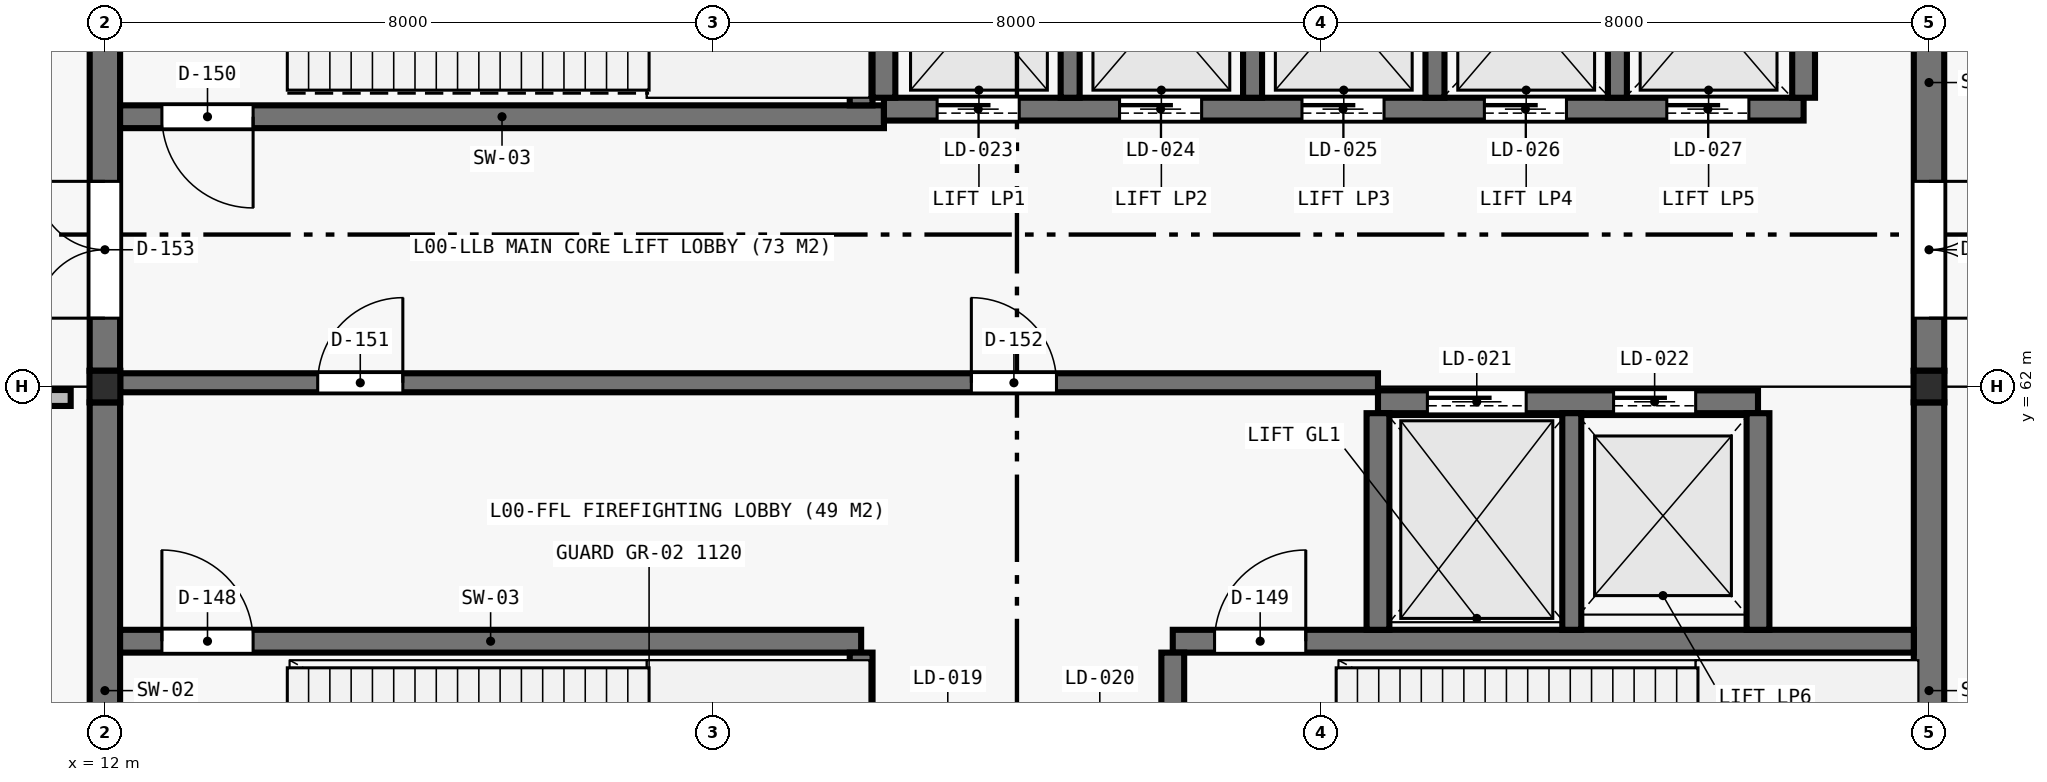
"""IFC4 building model, lengths in metres.
Left out: names, types, materials, properties, quantities, classifications, styles, units other than length and angle.
Written with IfcOpenShell. Run it as: python <this file> out.ifc"""

import sys

from ifc_helpers import new_model, si_unit, direction, frame, frame_2d, origin, origin_2d, place, context, subcontext, project, spatial, rectangle, i_section, extrude, element, fill, save


model = new_model("IFC4")
c1 = context("Model", 3, precision=1e-05, world=origin(), true_north=direction((0.0, 1.0)))
c2 = subcontext(c1, "Body", "Model", "MODEL_VIEW")
j1 = project(units=[si_unit("LENGTHUNIT", "METRE"), si_unit("PLANEANGLEUNIT", "RADIAN")], contexts=[c1])
p1 = place(None, origin())
s1 = spatial("IfcSite", under=j1, at=p1, CompositionType="ELEMENT")
p2 = place(p1, origin())
s2 = spatial("IfcBuilding", under=s1, at=p2, CompositionType="ELEMENT")
p3 = place(p2, origin())
s3 = spatial("IfcBuildingStorey", under=s2, at=p3, CompositionType="ELEMENT", Elevation=0.0)
for number, where, z_axis, x_axis in (
    (1, (12.0, 62.0, 0.0), (0.0, 0.0, 1.0), (1.0, 0.0, 0.0)),
    (2, (36.0, 62.0, 0.0), (0.0, 0.0, 1.0), (1.0, 0.0, 0.0)),
):
    element("IfcColumn", number, at=place(p3, frame(where, z_axis=z_axis, x_axis=x_axis)), inside=s3, PredefinedType="COLUMN", context=c2, shape_type="SweptSolid", body=[
        extrude(i_section(OverallWidth=0.406, OverallDepth=0.416, WebThickness=0.03, FlangeThickness=0.048, at=origin_2d()), origin(), (0.0, 0.0, 1.0), 6.02),
    ])
p4 = place(p3, frame((12.0, 54.208, 0.0), z_axis=(0.0, 0.0, 1.0), x_axis=(0.0, 1.0, 0.0)))
e3 = element("IfcWall", 3, at=p4, inside=s3, PredefinedType="SHEAR", context=c2, shape_type="SweptSolid", body=[
    extrude(rectangle(XDim=7.584, YDim=0.4, at=frame_2d((3.792, 0.0))), origin(), (0.0, 0.0, 1.0), 6.02),
])
p5 = place(p3, frame((12.0, 62.208, 0.0), z_axis=(0.0, 0.0, 1.0), x_axis=(0.0, 1.0, 0.0)))
e4 = element("IfcWall", 4, at=p5, inside=s3, PredefinedType="SHEAR", context=c2, shape_type="SweptSolid", body=[
    extrude(rectangle(XDim=7.584, YDim=0.4, at=frame_2d((3.792, 0.0))), origin(), (0.0, 0.0, 1.0), 6.02),
])
p6 = place(p5, frame((0.692, 0.0, 0.0)))
e5 = element("IfcOpeningElement", 5, at=p6, cuts=e4, PredefinedType="OPENING", context=c2, shape_type="SweptSolid", body=[
    extrude(rectangle(XDim=1.8, YDim=2.2, at=frame_2d((0.9, 1.1))), frame((0.0, 0.21, 0.0), z_axis=(0.0, -1.0, 0.0), x_axis=(1.0, 0.0, 0.0)), (0.0, 0.0, 1.0), 0.42),
])
p7 = place(p3, frame((36.0, 54.208, 0.0), z_axis=(0.0, 0.0, 1.0), x_axis=(0.0, 1.0, 0.0)))
e6 = element("IfcWall", 6, at=p7, inside=s3, PredefinedType="SHEAR", context=c2, shape_type="SweptSolid", body=[
    extrude(rectangle(XDim=7.584, YDim=0.4, at=frame_2d((3.792, 0.0))), origin(), (0.0, 0.0, 1.0), 6.02),
])
p8 = place(p3, frame((36.0, 62.208, 0.0), z_axis=(0.0, 0.0, 1.0), x_axis=(0.0, 1.0, 0.0)))
e7 = element("IfcWall", 7, at=p8, inside=s3, PredefinedType="SHEAR", context=c2, shape_type="SweptSolid", body=[
    extrude(rectangle(XDim=7.584, YDim=0.4, at=frame_2d((3.792, 0.0))), origin(), (0.0, 0.0, 1.0), 6.02),
])
p9 = place(p8, frame((0.692, 0.0, 0.0)))
e8 = element("IfcOpeningElement", 8, at=p9, cuts=e7, PredefinedType="OPENING", context=c2, shape_type="SweptSolid", body=[
    extrude(rectangle(XDim=1.8, YDim=2.2, at=frame_2d((0.9, 1.1))), frame((0.0, 0.21, 0.0), z_axis=(0.0, -1.0, 0.0), x_axis=(1.0, 0.0, 0.0)), (0.0, 0.0, 1.0), 0.42),
])
p10 = place(p3, frame((12.2, 58.65, 0.0), z_axis=(0.0, 0.0, 1.0), x_axis=(1.0, 0.0, 0.0)))
e9 = element("IfcWall", 9, at=p10, inside=s3, PredefinedType="SHEAR", context=c2, shape_type="SweptSolid", body=[
    extrude(rectangle(XDim=9.75, YDim=0.3, at=frame_2d((4.875, 0.0))), origin(), (0.0, 0.0, 1.0), 6.02),
])
p11 = place(p10, frame((0.55, 0.0, 0.0)))
e10 = element("IfcOpeningElement", 10, at=p11, cuts=e9, PredefinedType="OPENING", context=c2, shape_type="SweptSolid", body=[
    extrude(rectangle(XDim=1.2, YDim=2.2, at=frame_2d((0.6, 1.1))), frame((0.0, 0.16, 0.0), z_axis=(0.0, -1.0, 0.0), x_axis=(1.0, 0.0, 0.0)), (0.0, 0.0, 1.0), 0.32),
])
p12 = place(p3, frame((21.95, 54.25, 0.0), z_axis=(0.0, 0.0, 1.0), x_axis=(0.0, 1.0, 0.0)))
e11 = element("IfcWall", 11, at=p12, inside=s3, PredefinedType="SHEAR", context=c2, shape_type="SweptSolid", body=[
    extrude(rectangle(XDim=4.25, YDim=0.3, at=frame_2d((2.125, 0.0))), origin(), (0.0, 0.0, 1.0), 6.02),
])
p13 = place(p3, frame((26.05, 58.65, 0.0), z_axis=(0.0, 0.0, 1.0), x_axis=(1.0, 0.0, 0.0)))
e12 = element("IfcWall", 12, at=p13, inside=s3, PredefinedType="SHEAR", context=c2, shape_type="SweptSolid", body=[
    extrude(rectangle(XDim=9.75, YDim=0.3, at=frame_2d((4.875, 0.0))), origin(), (0.0, 0.0, 1.0), 6.02),
])
p14 = place(p13, frame((0.55, 0.0, 0.0)))
e13 = element("IfcOpeningElement", 13, at=p14, cuts=e12, PredefinedType="OPENING", context=c2, shape_type="SweptSolid", body=[
    extrude(rectangle(XDim=1.2, YDim=2.2, at=frame_2d((0.6, 1.1))), frame((0.0, 0.16, 0.0), z_axis=(0.0, -1.0, 0.0), x_axis=(1.0, 0.0, 0.0)), (0.0, 0.0, 1.0), 0.32),
])
p15 = place(p3, frame((26.05, 54.25, 0.0), z_axis=(0.0, 0.0, 1.0), x_axis=(0.0, 1.0, 0.0)))
e14 = element("IfcWall", 14, at=p15, inside=s3, PredefinedType="SHEAR", context=c2, shape_type="SweptSolid", body=[
    extrude(rectangle(XDim=4.25, YDim=0.3, at=frame_2d((2.125, 0.0))), origin(), (0.0, 0.0, 1.0), 6.02),
])
p16 = place(p3, frame((28.75, 61.8, 0.0), z_axis=(0.0, 0.0, 1.0), x_axis=(1.0, 0.0, 0.0)))
e15 = element("IfcWall", 15, at=p16, inside=s3, PredefinedType="SHEAR", context=c2, shape_type="SweptSolid", body=[
    extrude(rectangle(XDim=5.0, YDim=0.3, at=frame_2d((2.5, 0.0))), origin(), (0.0, 0.0, 1.0), 6.02),
])
p17 = place(p16, frame((0.65, 0.0, 0.0)))
e16 = element("IfcOpeningElement", 16, at=p17, cuts=e15, PredefinedType="OPENING", context=c2, shape_type="SweptSolid", body=[
    extrude(rectangle(XDim=1.3, YDim=2.3, at=frame_2d((0.65, 1.15))), frame((0.0, 0.16, 0.0), z_axis=(0.0, -1.0, 0.0), x_axis=(1.0, 0.0, 0.0)), (0.0, 0.0, 1.0), 0.32),
])
p18 = place(p16, frame((3.1, 0.0, 0.0)))
e17 = element("IfcOpeningElement", 17, at=p18, cuts=e15, PredefinedType="OPENING", context=c2, shape_type="SweptSolid", body=[
    extrude(rectangle(XDim=1.08, YDim=2.2, at=frame_2d((0.54, 1.1))), frame((0.0, 0.16, 0.0), z_axis=(0.0, -1.0, 0.0), x_axis=(1.0, 0.0, 0.0)), (0.0, 0.0, 1.0), 0.32),
])
for number, where, z_axis, x_axis in (
    (18, (28.75, 58.8, 0.0), (0.0, 0.0, 1.0), (0.0, 1.0, 0.0)),
    (19, (33.75, 58.8, 0.0), (0.0, 0.0, 1.0), (0.0, 1.0, 0.0)),
):
    element("IfcWall", number, at=place(p3, frame(where, z_axis=z_axis, x_axis=x_axis)), inside=s3, PredefinedType="SHEAR", context=c2, shape_type="SweptSolid", body=[
        extrude(rectangle(XDim=2.85, YDim=0.3, at=frame_2d((1.425, 0.0))), origin(), (0.0, 0.0, 1.0), 6.02),
    ])
p19 = place(p3, frame((31.3, 58.8, 0.0), z_axis=(0.0, 0.0, 1.0), x_axis=(0.0, 1.0, 0.0)))
e20 = element("IfcWall", 20, at=p19, inside=s3, PredefinedType="SHEAR", context=c2, shape_type="SweptSolid", body=[
    extrude(rectangle(XDim=2.85, YDim=0.25, at=frame_2d((1.425, 0.0))), origin(), (0.0, 0.0, 1.0), 6.02),
])
p20 = place(p3, frame((12.2, 62.05, 0.0), z_axis=(0.0, 0.0, 1.0), x_axis=(1.0, 0.0, 0.0)))
e21 = element("IfcWall", 21, at=p20, inside=s3, PredefinedType="SHEAR", context=c2, shape_type="SweptSolid", body=[
    extrude(rectangle(XDim=16.55, YDim=0.25, at=frame_2d((8.275, 0.0))), origin(), (0.0, 0.0, 1.0), 6.02),
])
p21 = place(p20, frame((2.6, 0.0, 0.0)))
e22 = element("IfcOpeningElement", 22, at=p21, cuts=e21, PredefinedType="OPENING", context=c2, shape_type="SweptSolid", body=[
    extrude(rectangle(XDim=1.12, YDim=2.22, at=frame_2d((0.56, 1.11))), frame((0.0, 0.135, 0.0), z_axis=(0.0, -1.0, 0.0), x_axis=(1.0, 0.0, 0.0)), (0.0, 0.0, 1.0), 0.27),
])
p22 = place(p20, frame((11.2, 0.0, 0.0)))
e23 = element("IfcOpeningElement", 23, at=p22, cuts=e21, PredefinedType="OPENING", context=c2, shape_type="SweptSolid", body=[
    extrude(rectangle(XDim=1.12, YDim=2.22, at=frame_2d((0.56, 1.11))), frame((0.0, 0.135, 0.0), z_axis=(0.0, -1.0, 0.0), x_axis=(1.0, 0.0, 0.0)), (0.0, 0.0, 1.0), 0.27),
])
p23 = place(p3, frame((12.2, 65.55, 0.0), z_axis=(0.0, 0.0, 1.0), x_axis=(1.0, 0.0, 0.0)))
e24 = element("IfcWall", 24, at=p23, inside=s3, PredefinedType="SHEAR", context=c2, shape_type="SweptSolid", body=[
    extrude(rectangle(XDim=10.05, YDim=0.3, at=frame_2d((5.025, 0.0))), origin(), (0.0, 0.0, 1.0), 6.02),
])
p24 = place(p23, frame((0.55, 0.0, 0.0)))
e25 = element("IfcOpeningElement", 25, at=p24, cuts=e24, PredefinedType="OPENING", context=c2, shape_type="SweptSolid", body=[
    extrude(rectangle(XDim=1.2, YDim=2.2, at=frame_2d((0.6, 1.1))), frame((0.0, 0.16, 0.0), z_axis=(0.0, -1.0, 0.0), x_axis=(1.0, 0.0, 0.0)), (0.0, 0.0, 1.0), 0.32),
])
p25 = place(p3, frame((21.95, 65.7, 0.0), z_axis=(0.0, 0.0, 1.0), x_axis=(0.0, 1.0, 0.0)))
e26 = element("IfcWall", 26, at=p25, inside=s3, PredefinedType="SHEAR", context=c2, shape_type="SweptSolid", body=[
    extrude(rectangle(XDim=4.05, YDim=0.3, at=frame_2d((2.025, 0.0))), origin(), (0.0, 0.0, 1.0), 6.02),
])
p26 = place(p3, frame((22.25, 65.65, 0.0), z_axis=(0.0, 0.0, 1.0), x_axis=(1.0, 0.0, 0.0)))
e27 = element("IfcWall", 27, at=p26, inside=s3, PredefinedType="SHEAR", context=c2, shape_type="SweptSolid", body=[
    extrude(rectangle(XDim=12.1, YDim=0.3, at=frame_2d((6.05, 0.0))), origin(), (0.0, 0.0, 1.0), 6.02),
])
p27 = place(p26, frame((0.7, 0.0, 0.0)))
e28 = element("IfcOpeningElement", 28, at=p27, cuts=e27, PredefinedType="OPENING", context=c2, shape_type="SweptSolid", body=[
    extrude(rectangle(XDim=1.08, YDim=2.2, at=frame_2d((0.54, 1.1))), frame((0.0, 0.16, 0.0), z_axis=(0.0, -1.0, 0.0), x_axis=(1.0, 0.0, 0.0)), (0.0, 0.0, 1.0), 0.32),
])
p28 = place(p26, frame((3.1, 0.0, 0.0)))
e29 = element("IfcOpeningElement", 29, at=p28, cuts=e27, PredefinedType="OPENING", context=c2, shape_type="SweptSolid", body=[
    extrude(rectangle(XDim=1.08, YDim=2.2, at=frame_2d((0.54, 1.1))), frame((0.0, 0.16, 0.0), z_axis=(0.0, -1.0, 0.0), x_axis=(1.0, 0.0, 0.0)), (0.0, 0.0, 1.0), 0.32),
])
p29 = place(p26, frame((5.5, 0.0, 0.0)))
e30 = element("IfcOpeningElement", 30, at=p29, cuts=e27, PredefinedType="OPENING", context=c2, shape_type="SweptSolid", body=[
    extrude(rectangle(XDim=1.08, YDim=2.2, at=frame_2d((0.54, 1.1))), frame((0.0, 0.16, 0.0), z_axis=(0.0, -1.0, 0.0), x_axis=(1.0, 0.0, 0.0)), (0.0, 0.0, 1.0), 0.32),
])
p30 = place(p26, frame((7.9, 0.0, 0.0)))
e31 = element("IfcOpeningElement", 31, at=p30, cuts=e27, PredefinedType="OPENING", context=c2, shape_type="SweptSolid", body=[
    extrude(rectangle(XDim=1.08, YDim=2.2, at=frame_2d((0.54, 1.1))), frame((0.0, 0.16, 0.0), z_axis=(0.0, -1.0, 0.0), x_axis=(1.0, 0.0, 0.0)), (0.0, 0.0, 1.0), 0.32),
])
p31 = place(p26, frame((10.3, 0.0, 0.0)))
e32 = element("IfcOpeningElement", 32, at=p31, cuts=e27, PredefinedType="OPENING", context=c2, shape_type="SweptSolid", body=[
    extrude(rectangle(XDim=1.08, YDim=2.2, at=frame_2d((0.54, 1.1))), frame((0.0, 0.16, 0.0), z_axis=(0.0, -1.0, 0.0), x_axis=(1.0, 0.0, 0.0)), (0.0, 0.0, 1.0), 0.32),
])
for number, where, z_axis, x_axis in (
    (33, (22.25, 65.8, 0.0), (0.0, 0.0, 1.0), (0.0, 1.0, 0.0)),
    (34, (34.35, 65.8, 0.0), (0.0, 0.0, 1.0), (0.0, 1.0, 0.0)),
):
    element("IfcWall", number, at=place(p3, frame(where, z_axis=z_axis, x_axis=x_axis)), inside=s3, PredefinedType="SHEAR", context=c2, shape_type="SweptSolid", body=[
        extrude(rectangle(XDim=2.3, YDim=0.3, at=frame_2d((1.15, 0.0))), origin(), (0.0, 0.0, 1.0), 6.02),
    ])
for number, where, z_axis, x_axis in (
    (35, (24.7, 65.8, 0.0), (0.0, 0.0, 1.0), (0.0, 1.0, 0.0)),
    (36, (27.1, 65.8, 0.0), (0.0, 0.0, 1.0), (0.0, 1.0, 0.0)),
    (37, (29.5, 65.8, 0.0), (0.0, 0.0, 1.0), (0.0, 1.0, 0.0)),
    (38, (31.9, 65.8, 0.0), (0.0, 0.0, 1.0), (0.0, 1.0, 0.0)),
):
    element("IfcWall", number, at=place(p3, frame(where, z_axis=z_axis, x_axis=x_axis)), inside=s3, PredefinedType="SHEAR", context=c2, shape_type="SweptSolid", body=[
        extrude(rectangle(XDim=2.3, YDim=0.25, at=frame_2d((1.15, 0.0))), origin(), (0.0, 0.0, 1.0), 6.02),
    ])
p32 = place(p3, frame((6.35, 61.85, 0.0), z_axis=(0.0, 0.0, 1.0), x_axis=(1.0, 0.0, 0.0)))
e39 = element("IfcWall", 39, at=p32, inside=s3, PredefinedType="PLUMBINGWALL", context=c2, shape_type="SweptSolid", body=[
    extrude(rectangle(XDim=5.2, YDim=0.21, at=frame_2d((2.6, 0.0))), origin(), (0.0, 0.0, 1.0), 4.92),
])
p33 = place(p32, frame((0.35, 0.0, 0.0)))
e40 = element("IfcOpeningElement", 40, at=p33, cuts=e39, PredefinedType="OPENING", context=c2, shape_type="SweptSolid", body=[
    extrude(rectangle(XDim=0.95, YDim=2.1, at=frame_2d((0.475, 1.05))), frame((0.0, 0.115, 0.0), z_axis=(0.0, -1.0, 0.0), x_axis=(1.0, 0.0, 0.0)), (0.0, 0.0, 1.0), 0.23),
])
p34 = place(p32, frame((2.1, 0.0, 0.0)))
e41 = element("IfcOpeningElement", 41, at=p34, cuts=e39, PredefinedType="OPENING", context=c2, shape_type="SweptSolid", body=[
    extrude(rectangle(XDim=0.9, YDim=2.1, at=frame_2d((0.45, 1.05))), frame((0.0, 0.115, 0.0), z_axis=(0.0, -1.0, 0.0), x_axis=(1.0, 0.0, 0.0)), (0.0, 0.0, 1.0), 0.23),
])
p35 = place(p32, frame((3.8, 0.0, 0.0)))
e42 = element("IfcOpeningElement", 42, at=p35, cuts=e39, PredefinedType="OPENING", context=c2, shape_type="SweptSolid", body=[
    extrude(rectangle(XDim=0.9, YDim=2.1, at=frame_2d((0.45, 1.05))), frame((0.0, 0.115, 0.0), z_axis=(0.0, -1.0, 0.0), x_axis=(1.0, 0.0, 0.0)), (0.0, 0.0, 1.0), 0.23),
])
p36 = place(p11, origin())
e43 = element("IfcDoor", 43, at=p36, inside=s3, OperationType="SINGLE_SWING_LEFT", PredefinedType="DOOR", context=c2, shape_type="SweptSolid", body=[
    extrude(rectangle(XDim=1.2, YDim=2.2, at=frame_2d((0.6, 1.1))), frame((0.0, 0.025, 0.0), z_axis=(0.0, -1.0, 0.0), x_axis=(1.0, 0.0, 0.0)), (0.0, 0.0, 1.0), 0.05),
])
fill(e10, e43)
p37 = place(p14, origin())
e44 = element("IfcDoor", 44, at=p37, inside=s3, OperationType="SINGLE_SWING_RIGHT", PredefinedType="DOOR", context=c2, shape_type="SweptSolid", body=[
    extrude(rectangle(XDim=1.2, YDim=2.2, at=frame_2d((0.6, 1.1))), frame((0.0, 0.025, 0.0), z_axis=(0.0, -1.0, 0.0), x_axis=(1.0, 0.0, 0.0)), (0.0, 0.0, 1.0), 0.05),
])
fill(e13, e44)
p38 = place(p24, frame((1.2, 0.0, 0.0), z_axis=(0.0, 0.0, 1.0), x_axis=(-1.0, 0.0, 0.0)))
e45 = element("IfcDoor", 45, at=p38, inside=s3, OperationType="SINGLE_SWING_LEFT", PredefinedType="DOOR", context=c2, shape_type="SweptSolid", body=[
    extrude(rectangle(XDim=1.2, YDim=2.2, at=frame_2d((0.6, 1.1))), frame((0.0, 0.025, 0.0), z_axis=(0.0, -1.0, 0.0), x_axis=(1.0, 0.0, 0.0)), (0.0, 0.0, 1.0), 0.05),
])
fill(e25, e45)
p39 = place(p17, origin())
e46 = element("IfcDoor", 46, at=p39, inside=s3, OperationType="SLIDING_TO_LEFT", PredefinedType="DOOR", context=c2, shape_type="SweptSolid", body=[
    extrude(rectangle(XDim=1.3, YDim=2.3, at=frame_2d((0.65, 1.15))), frame((0.0, 0.025, 0.0), z_axis=(0.0, -1.0, 0.0), x_axis=(1.0, 0.0, 0.0)), (0.0, 0.0, 1.0), 0.05),
])
fill(e16, e46)
p40 = place(p18, origin())
e47 = element("IfcDoor", 47, at=p40, inside=s3, OperationType="SLIDING_TO_LEFT", PredefinedType="DOOR", context=c2, shape_type="SweptSolid", body=[
    extrude(rectangle(XDim=1.08, YDim=2.2, at=frame_2d((0.54, 1.1))), frame((0.0, 0.025, 0.0), z_axis=(0.0, -1.0, 0.0), x_axis=(1.0, 0.0, 0.0)), (0.0, 0.0, 1.0), 0.05),
])
fill(e17, e47)
p41 = place(p27, origin())
e48 = element("IfcDoor", 48, at=p41, inside=s3, OperationType="SLIDING_TO_LEFT", PredefinedType="DOOR", context=c2, shape_type="SweptSolid", body=[
    extrude(rectangle(XDim=1.08, YDim=2.2, at=frame_2d((0.54, 1.1))), frame((0.0, 0.025, 0.0), z_axis=(0.0, -1.0, 0.0), x_axis=(1.0, 0.0, 0.0)), (0.0, 0.0, 1.0), 0.05),
])
fill(e28, e48)
p42 = place(p28, origin())
e49 = element("IfcDoor", 49, at=p42, inside=s3, OperationType="SLIDING_TO_LEFT", PredefinedType="DOOR", context=c2, shape_type="SweptSolid", body=[
    extrude(rectangle(XDim=1.08, YDim=2.2, at=frame_2d((0.54, 1.1))), frame((0.0, 0.025, 0.0), z_axis=(0.0, -1.0, 0.0), x_axis=(1.0, 0.0, 0.0)), (0.0, 0.0, 1.0), 0.05),
])
fill(e29, e49)
p43 = place(p29, origin())
e50 = element("IfcDoor", 50, at=p43, inside=s3, OperationType="SLIDING_TO_LEFT", PredefinedType="DOOR", context=c2, shape_type="SweptSolid", body=[
    extrude(rectangle(XDim=1.08, YDim=2.2, at=frame_2d((0.54, 1.1))), frame((0.0, 0.025, 0.0), z_axis=(0.0, -1.0, 0.0), x_axis=(1.0, 0.0, 0.0)), (0.0, 0.0, 1.0), 0.05),
])
fill(e30, e50)
p44 = place(p30, origin())
e51 = element("IfcDoor", 51, at=p44, inside=s3, OperationType="SLIDING_TO_LEFT", PredefinedType="DOOR", context=c2, shape_type="SweptSolid", body=[
    extrude(rectangle(XDim=1.08, YDim=2.2, at=frame_2d((0.54, 1.1))), frame((0.0, 0.025, 0.0), z_axis=(0.0, -1.0, 0.0), x_axis=(1.0, 0.0, 0.0)), (0.0, 0.0, 1.0), 0.05),
])
fill(e31, e51)
p45 = place(p31, origin())
e52 = element("IfcDoor", 52, at=p45, inside=s3, OperationType="SLIDING_TO_LEFT", PredefinedType="DOOR", context=c2, shape_type="SweptSolid", body=[
    extrude(rectangle(XDim=1.08, YDim=2.2, at=frame_2d((0.54, 1.1))), frame((0.0, 0.025, 0.0), z_axis=(0.0, -1.0, 0.0), x_axis=(1.0, 0.0, 0.0)), (0.0, 0.0, 1.0), 0.05),
])
fill(e32, e52)
p46 = place(p21, origin())
e53 = element("IfcDoor", 53, at=p46, inside=s3, OperationType="SINGLE_SWING_RIGHT", PredefinedType="DOOR", context=c2, shape_type="SweptSolid", body=[
    extrude(rectangle(XDim=1.12, YDim=2.22, at=frame_2d((0.56, 1.11))), frame((0.0, 0.025, 0.0), z_axis=(0.0, -1.0, 0.0), x_axis=(1.0, 0.0, 0.0)), (0.0, 0.0, 1.0), 0.05),
])
fill(e22, e53)
p47 = place(p22, origin())
e54 = element("IfcDoor", 54, at=p47, inside=s3, OperationType="SINGLE_SWING_LEFT", PredefinedType="DOOR", context=c2, shape_type="SweptSolid", body=[
    extrude(rectangle(XDim=1.12, YDim=2.22, at=frame_2d((0.56, 1.11))), frame((0.0, 0.025, 0.0), z_axis=(0.0, -1.0, 0.0), x_axis=(1.0, 0.0, 0.0)), (0.0, 0.0, 1.0), 0.05),
])
fill(e23, e54)
p48 = place(p6, origin())
e55 = element("IfcDoor", 55, at=p48, inside=s3, OperationType="DOUBLE_DOOR_SINGLE_SWING", PredefinedType="DOOR", context=c2, shape_type="SweptSolid", body=[
    extrude(rectangle(XDim=1.8, YDim=2.2, at=frame_2d((0.9, 1.1))), frame((0.0, 0.025, 0.0), z_axis=(0.0, -1.0, 0.0), x_axis=(1.0, 0.0, 0.0)), (0.0, 0.0, 1.0), 0.05),
])
fill(e5, e55)
p49 = place(p9, frame((1.8, 0.0, 0.0), z_axis=(0.0, 0.0, 1.0), x_axis=(-1.0, 0.0, 0.0)))
e56 = element("IfcDoor", 56, at=p49, inside=s3, OperationType="DOUBLE_DOOR_SINGLE_SWING", PredefinedType="DOOR", context=c2, shape_type="SweptSolid", body=[
    extrude(rectangle(XDim=1.8, YDim=2.2, at=frame_2d((0.9, 1.1))), frame((0.0, 0.025, 0.0), z_axis=(0.0, -1.0, 0.0), x_axis=(1.0, 0.0, 0.0)), (0.0, 0.0, 1.0), 0.05),
])
fill(e8, e56)
save(model, sys.argv[1])
